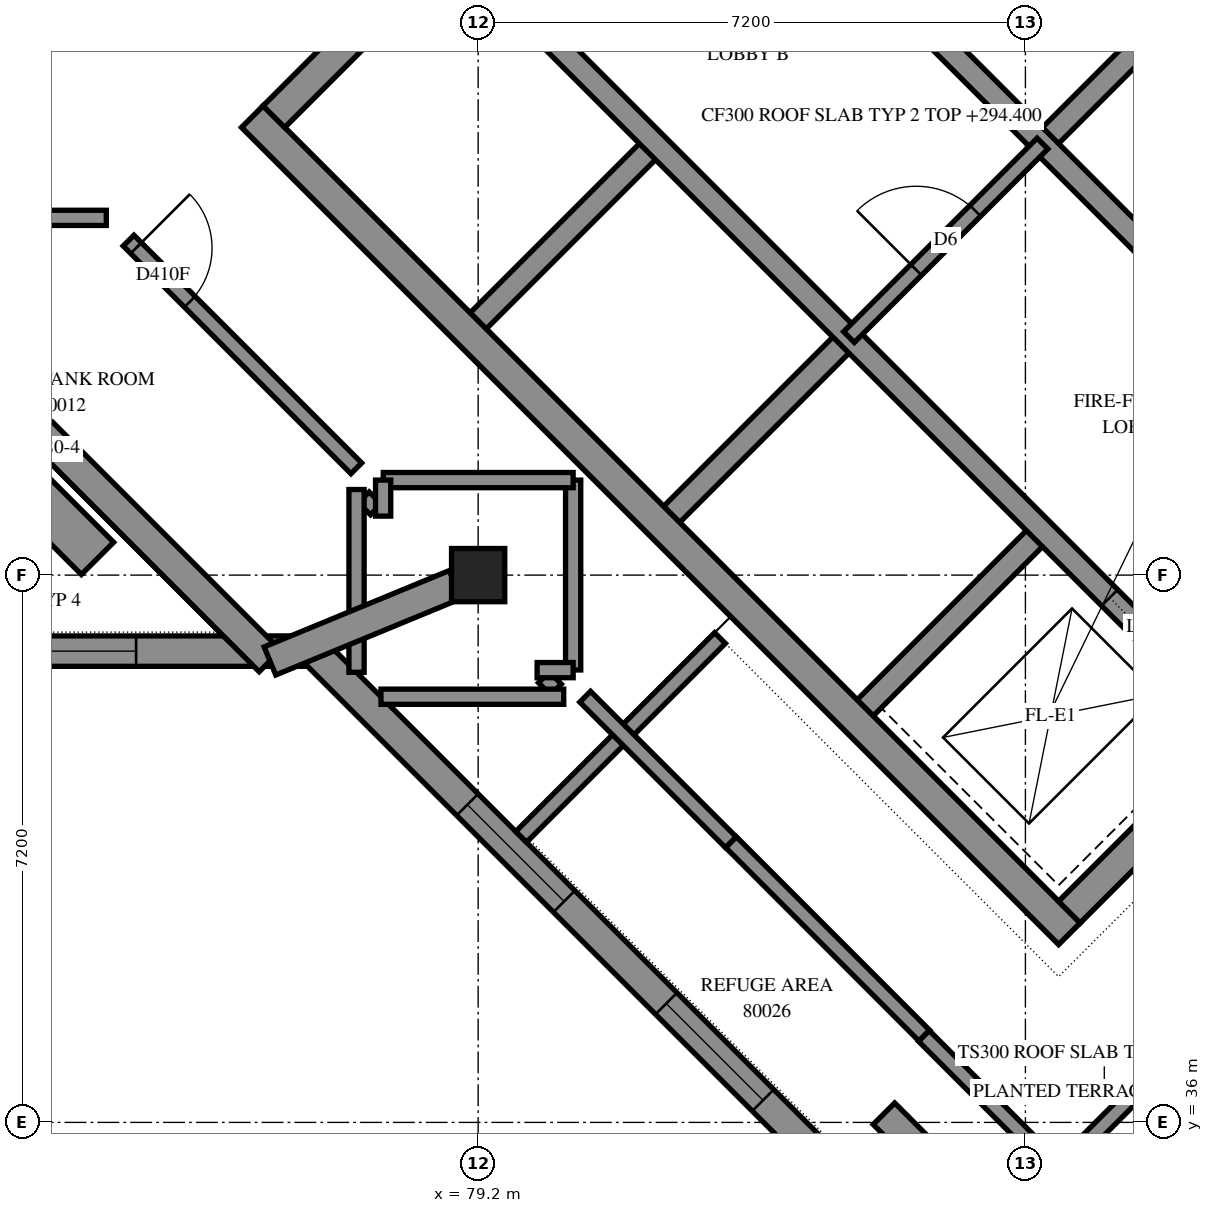
"""IFC4 building model, lengths in metres.
Left out: names, types, materials, properties, quantities, classifications, styles, units other than length and angle.
Written with IfcOpenShell. Run it as: python <this file> out.ifc"""

import sys

from ifc_helpers import new_model, si_unit, direction, frame, frame_2d, origin, origin_2d, place, context, subcontext, project, spatial, polyline, rectangle, outline, extrude, element, fill, save


model = new_model("IFC4")
c1 = context("Model", 3, precision=1e-05, world=origin(), true_north=direction((0.0, 1.0)))
c2 = subcontext(c1, "Body", "Model", "MODEL_VIEW")
j1 = project(units=[si_unit("LENGTHUNIT", "METRE"), si_unit("PLANEANGLEUNIT", "RADIAN")], contexts=[c1])
p1 = place(None, origin())
s1 = spatial("IfcSite", under=j1, at=p1, CompositionType="ELEMENT")
p2 = place(p1, origin())
s2 = spatial("IfcBuilding", under=s1, at=p2, CompositionType="ELEMENT")
p3 = place(p2, frame((0.0, 0.0, 294.4)))
s3 = spatial("IfcBuildingStorey", under=s2, at=p3, CompositionType="ELEMENT", Elevation=294.4)
p4 = place(p3, frame((79.2, 43.2, 0.0), z_axis=(0.0, 0.0, 1.0), x_axis=(1.0, 0.0, 0.0)))
e1 = element("IfcColumn", 1, at=p4, inside=s3, PredefinedType="COLUMN", context=c2, shape_type="SweptSolid", body=[
    extrude(rectangle(XDim=0.7, YDim=0.7, at=origin_2d()), origin(), (0.0, 0.0, 1.0), 3.5),
])
p5 = place(p3, frame((76.23, 49.231, -0.3), z_axis=(0.0, 0.0, 1.0), x_axis=(0.7071034917, -0.7071100706, 0.0)))
e2 = element("IfcWall", 2, at=p5, inside=s3, PredefinedType="SHEAR", context=c2, shape_type="SweptSolid", body=[
    extrude(outline(polyline([(0.0, 0.0), (15.2, 0.0), (15.2, 3.1), (0.0, 3.1), (0.0, 0.0)])), frame((0.0, 0.2, 0.0), z_axis=(0.0, -1.0, 0.0), x_axis=(1.0, 0.0, 0.0)), (0.0, 0.0, 1.0), 0.4),
])
p6 = place(p3, frame((86.695, 59.696, -0.3), z_axis=(0.0, 0.0, 1.0), x_axis=(0.7071100706, -0.7071034917, 0.0)))
e3 = element("IfcWall", 3, at=p6, inside=s3, PredefinedType="SHEAR", context=c2, shape_type="SweptSolid", body=[
    extrude(outline(polyline([(0.0, 0.0), (15.2, 0.0), (15.2, 3.1), (0.0, 3.1), (0.0, 0.0)])), frame((0.0, 0.2, 0.0), z_axis=(0.0, -1.0, 0.0), x_axis=(1.0, 0.0, 0.0)), (0.0, 0.0, 1.0), 0.4),
])
p7 = place(p6, frame((10.4, 0.0, 0.3)))
e4 = element("IfcOpeningElement", 4, at=p7, cuts=e3, PredefinedType="OPENING", context=c2, shape_type="SweptSolid", body=[
    extrude(rectangle(XDim=0.8, YDim=2.1, at=frame_2d((0.4, 1.05))), frame((0.0, 0.21, 0.0), z_axis=(0.0, -1.0, 0.0), x_axis=(1.0, 0.0, 0.0)), (0.0, 0.0, 1.0), 0.42),
])
p8 = place(p3, frame((76.513, 49.231, -0.3), z_axis=(0.0, 0.0, 1.0), x_axis=(0.7071067812, 0.7071067812, 0.0)))
e5 = element("IfcWall", 5, at=p8, inside=s3, PredefinedType="SHEAR", context=c2, shape_type="SweptSolid", body=[
    extrude(outline(polyline([(0.0, 0.0), (14.4, 0.0), (14.4, 3.1), (0.0, 3.1), (0.0, 0.0)])), frame((0.0, 0.2, 0.0), z_axis=(0.0, -1.0, 0.0), x_axis=(1.0, 0.0, 0.0)), (0.0, 0.0, 1.0), 0.4),
])
p9 = place(p8, frame((4.55, 0.0, 0.3)))
e6 = element("IfcOpeningElement", 6, at=p9, cuts=e5, PredefinedType="OPENING", context=c2, shape_type="SweptSolid", body=[
    extrude(rectangle(XDim=1.1, YDim=2.1, at=frame_2d((0.55, 1.05))), frame((0.0, 0.21, 0.0), z_axis=(0.0, -1.0, 0.0), x_axis=(1.0, 0.0, 0.0)), (0.0, 0.0, 1.0), 0.42),
])
p10 = place(p8, frame((11.35, 0.0, 0.3)))
e7 = element("IfcOpeningElement", 7, at=p10, cuts=e5, PredefinedType="OPENING", context=c2, shape_type="SweptSolid", body=[
    extrude(rectangle(XDim=1.1, YDim=2.1, at=frame_2d((0.55, 1.05))), frame((0.0, 0.21, 0.0), z_axis=(0.0, -1.0, 0.0), x_axis=(1.0, 0.0, 0.0)), (0.0, 0.0, 1.0), 0.42),
])
p11 = place(p3, frame((86.978, 38.766, -0.3), z_axis=(0.0, 0.0, 1.0), x_axis=(0.7071067812, 0.7071067812, 0.0)))
e8 = element("IfcWall", 8, at=p11, inside=s3, PredefinedType="SHEAR", context=c2, shape_type="SweptSolid", body=[
    extrude(outline(polyline([(0.0, 0.0), (14.4, 0.0), (14.4, 3.1), (0.0, 3.1), (0.0, 0.0)])), frame((0.0, 0.2, 0.0), z_axis=(0.0, -1.0, 0.0), x_axis=(1.0, 0.0, 0.0)), (0.0, 0.0, 1.0), 0.4),
])
p12 = place(p11, frame((4.55, 0.0, 0.3)))
e9 = element("IfcOpeningElement", 9, at=p12, cuts=e8, PredefinedType="OPENING", context=c2, shape_type="SweptSolid", body=[
    extrude(rectangle(XDim=1.1, YDim=2.1, at=frame_2d((0.55, 1.05))), frame((0.0, 0.21, 0.0), z_axis=(0.0, -1.0, 0.0), x_axis=(1.0, 0.0, 0.0)), (0.0, 0.0, 1.0), 0.42),
])
p13 = place(p11, frame((11.35, 0.0, 0.3)))
e10 = element("IfcOpeningElement", 10, at=p13, cuts=e8, PredefinedType="OPENING", context=c2, shape_type="SweptSolid", body=[
    extrude(rectangle(XDim=1.1, YDim=2.1, at=frame_2d((0.55, 1.05))), frame((0.0, 0.21, 0.0), z_axis=(0.0, -1.0, 0.0), x_axis=(1.0, 0.0, 0.0)), (0.0, 0.0, 1.0), 0.42),
])
p14 = place(p3, frame((79.2, 46.544, 0.0), z_axis=(0.0, 0.0, 1.0), x_axis=(0.7071219326, 0.7070916295, 0.0)))
e11 = element("IfcWall", 11, at=p14, inside=s3, PredefinedType="SOLIDWALL", context=c2, shape_type="SweptSolid", body=[
    extrude(outline(polyline([(0.0, 0.0), (3.3, 0.0), (3.3, 3.5), (0.0, 3.5), (0.0, 0.0)])), frame((0.0, 0.15, 0.0), z_axis=(0.0, -1.0, 0.0), x_axis=(1.0, 0.0, 0.0)), (0.0, 0.0, 1.0), 0.3),
])
p15 = place(p3, frame((81.746, 43.999, 0.0), z_axis=(0.0, 0.0, 1.0), x_axis=(0.7071067812, 0.7071067812, 0.0)))
e12 = element("IfcWall", 12, at=p15, inside=s3, PredefinedType="SOLIDWALL", context=c2, shape_type="SweptSolid", body=[
    extrude(outline(polyline([(0.0, 0.0), (3.3, 0.0), (3.3, 3.5), (0.0, 3.5), (0.0, 0.0)])), frame((0.0, 0.15, 0.0), z_axis=(0.0, -1.0, 0.0), x_axis=(1.0, 0.0, 0.0)), (0.0, 0.0, 1.0), 0.3),
])
p16 = place(p3, frame((86.625, 48.878, 0.0), z_axis=(0.0, 0.0, 1.0), x_axis=(0.7071067812, 0.7071067812, 0.0)))
e13 = element("IfcWall", 13, at=p16, inside=s3, PredefinedType="SOLIDWALL", context=c2, shape_type="SweptSolid", body=[
    extrude(outline(polyline([(0.0, 0.0), (3.3, 0.0), (3.3, 3.5), (0.0, 3.5), (0.0, 0.0)])), frame((0.0, 0.15, 0.0), z_axis=(0.0, -1.0, 0.0), x_axis=(1.0, 0.0, 0.0)), (0.0, 0.0, 1.0), 0.3),
])
p17 = place(p3, frame((84.291, 41.453, 0.0), z_axis=(0.0, 0.0, 1.0), x_axis=(0.7071067812, 0.7071067812, 0.0)))
e14 = element("IfcWall", 14, at=p17, inside=s3, PredefinedType="SOLIDWALL", context=c2, shape_type="SweptSolid", body=[
    extrude(outline(polyline([(0.0, 0.0), (3.3, 0.0), (3.3, 3.5), (0.0, 3.5), (0.0, 0.0)])), frame((0.0, 0.15, 0.0), z_axis=(0.0, -1.0, 0.0), x_axis=(1.0, 0.0, 0.0)), (0.0, 0.0, 1.0), 0.3),
])
p18 = place(p3, frame((78.988, 51.423, 0.0), z_axis=(0.0, 0.0, 1.0), x_axis=(0.7071067812, -0.7071067812, 0.0)))
e15 = element("IfcWall", 15, at=p18, inside=s3, PredefinedType="SOLIDWALL", context=c2, shape_type="SweptSolid", body=[
    extrude(outline(polyline([(0.0, 0.0), (14.4, 0.0), (14.4, 3.5), (0.0, 3.5), (0.0, 0.0)])), frame((0.0, 0.15, 0.0), z_axis=(0.0, -1.0, 0.0), x_axis=(1.0, 0.0, 0.0)), (0.0, 0.0, 1.0), 0.3),
])
p19 = place(p18, frame((12.05, 0.0, 0.0)))
e16 = element("IfcOpeningElement", 16, at=p19, cuts=e15, PredefinedType="OPENING", context=c2, shape_type="SweptSolid", body=[
    extrude(rectangle(XDim=1.1, YDim=2.1, at=frame_2d((0.55, 1.05))), frame((0.0, 0.16, 0.0), z_axis=(0.0, -1.0, 0.0), x_axis=(1.0, 0.0, 0.0)), (0.0, 0.0, 1.0), 0.32),
])
p20 = place(p3, frame((81.534, 53.969, 0.0), z_axis=(0.0, 0.0, 1.0), x_axis=(0.707103309, -0.7071102534, 0.0)))
e17 = element("IfcWall", 17, at=p20, inside=s3, PredefinedType="SOLIDWALL", context=c2, shape_type="SweptSolid", body=[
    extrude(outline(polyline([(0.0, 0.0), (14.4, 0.0), (14.4, 3.5), (0.0, 3.5), (0.0, 0.0)])), frame((0.0, 0.15, 0.0), z_axis=(0.0, -1.0, 0.0), x_axis=(1.0, 0.0, 0.0)), (0.0, 0.0, 1.0), 0.3),
])
p21 = place(p20, frame((12.05, 0.0, 0.0)))
e18 = element("IfcOpeningElement", 18, at=p21, cuts=e17, PredefinedType="OPENING", context=c2, shape_type="SweptSolid", body=[
    extrude(rectangle(XDim=1.1, YDim=2.1, at=frame_2d((0.55, 1.05))), frame((0.0, 0.16, 0.0), z_axis=(0.0, -1.0, 0.0), x_axis=(1.0, 0.0, 0.0)), (0.0, 0.0, 1.0), 0.32),
])
p22 = place(p3, frame((71.0, 42.2, 0.0), z_axis=(0.0, 0.0, 1.0), x_axis=(1.0, 0.0, 0.0)))
e19 = element("IfcWall", 19, at=p22, inside=s3, PredefinedType="SOLIDWALL", context=c2, shape_type="SweptSolid", body=[
    extrude(outline(polyline([(-0.2, -0.2), (5.956, -0.2), (6.122, 0.2), (0.2, 0.2), (-0.2, -0.2)])), origin(), (0.0, 0.0, 1.0), 3.5),
])
p23 = place(p22, frame((1.9, 0.0, 0.7)))
e20 = element("IfcOpeningElement", 20, at=p23, cuts=e19, PredefinedType="OPENING", context=c2, shape_type="SweptSolid", body=[
    extrude(rectangle(XDim=1.8, YDim=2.2, at=frame_2d((0.9, 1.1))), frame((0.0, 0.21, 0.0), z_axis=(0.0, -1.0, 0.0), x_axis=(1.0, 0.0, 0.0)), (0.0, 0.0, 1.0), 0.42),
])
p24 = place(p3, frame((77.039, 42.2, 0.0), z_axis=(0.0, 0.0, 1.0), x_axis=(0.7071067812, -0.7071067812, 0.0)))
e21 = element("IfcWall", 21, at=p24, inside=s3, PredefinedType="SOLIDWALL", context=c2, shape_type="SweptSolid", body=[
    extrude(outline(polyline([(0.083, -0.2), (17.656, -0.2), (17.256, 0.2), (-0.083, 0.2), (0.083, -0.2)])), origin(), (0.0, 0.0, 1.0), 3.5),
])
p25 = place(p24, frame((2.857, 0.0, 0.7)))
e22 = element("IfcOpeningElement", 22, at=p25, cuts=e21, PredefinedType="OPENING", context=c2, shape_type="SweptSolid", body=[
    extrude(rectangle(XDim=1.8, YDim=2.2, at=frame_2d((0.9, 1.1))), frame((0.0, 0.21, 0.0), z_axis=(0.0, -1.0, 0.0), x_axis=(1.0, 0.0, 0.0)), (0.0, 0.0, 1.0), 0.42),
])
p26 = place(p24, frame((6.556, 0.0, 0.7)))
e23 = element("IfcOpeningElement", 23, at=p26, cuts=e21, PredefinedType="OPENING", context=c2, shape_type="SweptSolid", body=[
    extrude(rectangle(XDim=1.8, YDim=2.2, at=frame_2d((0.9, 1.1))), frame((0.0, 0.21, 0.0), z_axis=(0.0, -1.0, 0.0), x_axis=(1.0, 0.0, 0.0)), (0.0, 0.0, 1.0), 0.42),
])
p27 = place(p24, frame((10.156, 0.0, 0.7)))
e24 = element("IfcOpeningElement", 24, at=p27, cuts=e21, PredefinedType="OPENING", context=c2, shape_type="SweptSolid", body=[
    extrude(rectangle(XDim=1.8, YDim=2.2, at=frame_2d((0.9, 1.1))), frame((0.0, 0.21, 0.0), z_axis=(0.0, -1.0, 0.0), x_axis=(1.0, 0.0, 0.0)), (0.0, 0.0, 1.0), 0.42),
])
p28 = place(p24, frame((13.757, 0.0, 0.7)))
e25 = element("IfcOpeningElement", 25, at=p28, cuts=e21, PredefinedType="OPENING", context=c2, shape_type="SweptSolid", body=[
    extrude(rectangle(XDim=1.8, YDim=2.2, at=frame_2d((0.9, 1.1))), frame((0.0, 0.21, 0.0), z_axis=(0.0, -1.0, 0.0), x_axis=(1.0, 0.0, 0.0)), (0.0, 0.0, 1.0), 0.42),
])
p29 = place(p3, frame((75.99, 42.4, 0.0), z_axis=(0.0, 0.0, 1.0), x_axis=(-0.7071067812, 0.7071067812, 0.0)))
e26 = element("IfcWall", 26, at=p29, inside=s3, PredefinedType="PARAPET", context=c2, shape_type="SweptSolid", body=[
    extrude(outline(polyline([(0.0, -0.1), (6.774, -0.1), (6.774, 0.1), (0.0, 0.1), (0.0, -0.1)])), origin(), (0.0, 0.0, 1.0), 0.25),
])
p30 = place(p3, frame((82.382, 42.372, 0.0), z_axis=(0.0, 0.0, 1.0), x_axis=(-0.7071202943, -0.7070932678, 0.0)))
e27 = element("IfcWall", 27, at=p30, inside=s3, PredefinedType="PARAPET", context=c2, shape_type="SweptSolid", body=[
    extrude(outline(polyline([(0.0, -0.1), (3.7, -0.1), (3.7, 0.1), (0.0, 0.1), (0.0, -0.1)])), origin(), (0.0, 0.0, 1.0), 0.25),
])
p31 = place(p3, frame((84.079, 46.332, 0.0), z_axis=(0.0, 0.0, 1.0), x_axis=(0.7071067812, 0.7071067812, 0.0)))
e28 = element("IfcWall", 28, at=p31, inside=s3, PredefinedType="PARTITIONING", context=c2, shape_type="SweptSolid", body=[
    extrude(outline(polyline([(0.0, 0.0), (3.6, 0.0), (3.6, 3.5), (0.0, 3.5), (0.0, 0.0)])), frame((0.0, 0.1, 0.0), z_axis=(0.0, -1.0, 0.0), x_axis=(1.0, 0.0, 0.0)), (0.0, 0.0, 1.0), 0.2),
])
p32 = place(p31, frame((1.25, 0.0, 0.0)))
e29 = element("IfcOpeningElement", 29, at=p32, cuts=e28, PredefinedType="OPENING", context=c2, shape_type="SweptSolid", body=[
    extrude(rectangle(XDim=1.1, YDim=2.1, at=frame_2d((0.55, 1.05))), frame((0.0, 0.11, 0.0), z_axis=(0.0, -1.0, 0.0), x_axis=(1.0, 0.0, 0.0)), (0.0, 0.0, 1.0), 0.22),
])
p33 = place(p3, frame((86.836, 35.372, 0.0), z_axis=(0.0, 0.0, 1.0), x_axis=(0.7071067812, 0.7071067812, 0.0)))
e30 = element("IfcWall", 30, at=p33, inside=s3, PredefinedType="PARTITIONING", context=c2, shape_type="SweptSolid", body=[
    extrude(rectangle(XDim=8.651, YDim=0.2, at=frame_2d((4.325, 0.0))), origin(), (0.0, 0.0, 1.0), 3.5),
])
p34 = place(p33, frame((7.502, 0.0, 0.0)))
e31 = element("IfcOpeningElement", 31, at=p34, cuts=e30, PredefinedType="OPENING", context=c2, shape_type="SweptSolid", body=[
    extrude(rectangle(XDim=1.0, YDim=2.1, at=frame_2d((0.5, 1.05))), frame((0.0, 0.11, 0.0), z_axis=(0.0, -1.0, 0.0), x_axis=(1.0, 0.0, 0.0)), (0.0, 0.0, 1.0), 0.22),
])
p35 = place(p3, frame((74.601, 47.601, 0.0), z_axis=(0.0, 0.0, 1.0), x_axis=(0.7071067812, -0.7071067812, 0.0)))
e32 = element("IfcWall", 32, at=p35, inside=s3, PredefinedType="PARTITIONING", context=c2, shape_type="SweptSolid", body=[
    extrude(rectangle(XDim=4.237, YDim=0.2, at=frame_2d((2.119, 0.0))), origin(), (0.0, 0.0, 1.0), 3.5),
])
p36 = place(p35, frame((0.139, 0.0, 0.0)))
e33 = element("IfcOpeningElement", 33, at=p36, cuts=e32, PredefinedType="OPENING", context=c2, shape_type="SweptSolid", body=[
    extrude(rectangle(XDim=1.0, YDim=2.1, at=frame_2d((0.5, 1.05))), frame((0.0, 0.11, 0.0), z_axis=(0.0, -1.0, 0.0), x_axis=(1.0, 0.0, 0.0)), (0.0, 0.0, 1.0), 0.22),
])
p37 = place(p3, frame((82.526, 39.688, 0.0), z_axis=(0.0, 0.0, 1.0), x_axis=(0.7068288851, -0.7073845681, 0.0)))
e34 = element("IfcWall", 34, at=p37, inside=s3, PredefinedType="PARTITIONING", context=c2, shape_type="SweptSolid", body=[
    extrude(rectangle(XDim=3.599, YDim=0.2, at=frame_2d((1.8, 0.0))), origin(), (0.0, 0.0, 1.0), 3.5),
])
p38 = place(p3, frame((80.608, 41.6, 0.0), z_axis=(0.0, 0.0, 1.0), x_axis=(0.7074759311, -0.7067374385, 0.0)))
e35 = element("IfcWall", 35, at=p38, inside=s3, PredefinedType="PARTITIONING", context=c2, shape_type="SweptSolid", body=[
    extrude(rectangle(XDim=2.708, YDim=0.2, at=frame_2d((1.354, 0.0))), origin(), (0.0, 0.0, 1.0), 3.5),
])
p39 = place(p3, frame((85.065, 37.137, 0.0), z_axis=(0.0, 0.0, 1.0), x_axis=(0.7071067812, -0.7071067812, 0.0)))
e36 = element("IfcWall", 36, at=p39, inside=s3, PredefinedType="PARTITIONING", context=c2, shape_type="SweptSolid", body=[
    extrude(rectangle(XDim=2.5, YDim=0.2, at=frame_2d((1.25, 0.0))), origin(), (0.0, 0.0, 1.0), 3.5),
])
for number, where, z_axis, x_axis in (
    (37, (80.45, 41.952, 0.0), (0.0, 0.0, 1.0), (0.0, 1.0, 0.0)),
    (38, (77.952, 44.45, 0.0), (0.0, 0.0, 1.0), (1.0, 0.0, 0.0)),
):
    element("IfcWall", number, at=place(p3, frame(where, z_axis=z_axis, x_axis=x_axis)), inside=s3, PredefinedType="PARTITIONING", context=c2, shape_type="SweptSolid", body=[
        extrude(rectangle(XDim=2.498, YDim=0.2, at=frame_2d((1.249, 0.0))), origin(), (0.0, 0.0, 1.0), 3.5),
    ])
for number, where, z_axis, x_axis in (
    (39, (77.696, 44.224, 0.0), (0.0, 0.0, 1.0), (0.707, -0.707, 0.0)),
    (40, (80.065, 41.855, 0.0), (0.0, 0.0, 1.0), (0.707, -0.707, 0.0)),
):
    element("IfcWall", number, at=place(p3, frame(where, z_axis=z_axis, x_axis=x_axis)), inside=s3, PredefinedType="PARTITIONING", context=c2, shape_type="SweptSolid", body=[
        extrude(rectangle(XDim=0.225, YDim=0.2, at=frame_2d((0.113, 0.0))), origin(), (0.0, 0.0, 1.0), 3.5),
    ])
for number, where, z_axis, x_axis in (
    (41, (79.976, 41.95, 0.0), (0.0, 0.0, 1.0), (1.0, 0.0, 0.0)),
    (42, (77.95, 43.976, 0.0), (0.0, 0.0, 1.0), (0.0, 1.0, 0.0)),
):
    element("IfcWall", number, at=place(p3, frame(where, z_axis=z_axis, x_axis=x_axis)), inside=s3, PredefinedType="PARTITIONING", context=c2, shape_type="SweptSolid", body=[
        extrude(rectangle(XDim=0.474, YDim=0.2, at=frame_2d((0.237, 0.0))), origin(), (0.0, 0.0, 1.0), 3.5),
    ])
p40 = place(p3, frame((74.192, 43.42, 0.0), z_axis=(0.0, 0.0, 1.0), x_axis=(-0.7071067812, 0.7071067812, 0.0)))
e43 = element("IfcWall", 43, at=p40, inside=s3, PredefinedType="SOLIDWALL", context=c2, shape_type="SweptSolid", body=[
    extrude(outline(polyline([(0.0, -0.3), (2.789, -0.3), (2.789, 0.3), (0.0, 0.3), (0.0, -0.3)])), origin(), (0.0, 0.0, 1.0), 0.65),
])
p41 = place(p3, frame((86.272, 33.25, 0.0), z_axis=(0.0, 0.0, 1.0), x_axis=(0.7073028348, 0.7069106732, 0.0)))
e44 = element("IfcWall", 44, at=p41, inside=s3, PredefinedType="PARTITIONING", context=c2, shape_type="SweptSolid", body=[
    extrude(outline(polyline([(0.0, -0.1), (5.1, -0.1), (5.1, 0.1), (0.0, 0.1), (0.0, -0.1)])), origin(), (0.0, 0.0, 1.0), 3.5),
])
p42 = place(p3, frame((71.2, 47.9, 0.0), z_axis=(0.0, 0.0, 1.0), x_axis=(1.0, 0.0, 0.0)))
e45 = element("IfcWall", 45, at=p42, inside=s3, PredefinedType="PARTITIONING", context=c2, shape_type="SweptSolid", body=[
    extrude(outline(polyline([(0.0, -0.1), (3.108, -0.1), (3.108, 0.1), (0.0, 0.1), (0.0, -0.1)])), origin(), (0.0, 0.0, 1.0), 3.5),
])
for number, where, z_axis, x_axis in (
    (46, (77.6, 41.922, 0.0), (0.0, 0.0, 1.0), (0.0, 1.0, 0.0)),
    (47, (77.922, 41.6, 0.0), (0.0, 0.0, 1.0), (1.0, 0.0, 0.0)),
):
    element("IfcWall", number, at=place(p3, frame(where, z_axis=z_axis, x_axis=x_axis)), inside=s3, PredefinedType="PARTITIONING", context=c2, shape_type="SweptSolid", body=[
        extrude(outline(polyline([(0.0, -0.1), (2.404, -0.1), (2.404, 0.1), (0.0, 0.1), (0.0, -0.1)])), origin(), (0.0, 0.0, 1.0), 3.5),
    ])
p43 = place(p23, origin())
e48 = element("IfcWindow", 48, at=p43, inside=s3, PartitioningType="SINGLE_PANEL", PredefinedType="WINDOW", context=c2, shape_type="SweptSolid", body=[
    extrude(rectangle(XDim=1.8, YDim=2.2, at=frame_2d((0.9, 1.1))), frame((0.0, 0.08, 0.0), z_axis=(0.0, -1.0, 0.0), x_axis=(1.0, 0.0, 0.0)), (0.0, 0.0, 1.0), 0.06),
])
fill(e20, e48)
p44 = place(p25, origin())
e49 = element("IfcWindow", 49, at=p44, inside=s3, PartitioningType="SINGLE_PANEL", PredefinedType="WINDOW", context=c2, shape_type="SweptSolid", body=[
    extrude(rectangle(XDim=1.8, YDim=2.2, at=frame_2d((0.9, 1.1))), frame((0.0, 0.08, 0.0), z_axis=(0.0, -1.0, 0.0), x_axis=(1.0, 0.0, 0.0)), (0.0, 0.0, 1.0), 0.06),
])
fill(e22, e49)
p45 = place(p26, origin())
e50 = element("IfcWindow", 50, at=p45, inside=s3, PartitioningType="SINGLE_PANEL", PredefinedType="WINDOW", context=c2, shape_type="SweptSolid", body=[
    extrude(rectangle(XDim=1.8, YDim=2.2, at=frame_2d((0.9, 1.1))), frame((0.0, 0.08, 0.0), z_axis=(0.0, -1.0, 0.0), x_axis=(1.0, 0.0, 0.0)), (0.0, 0.0, 1.0), 0.06),
])
fill(e23, e50)
p46 = place(p32, origin())
e51 = element("IfcDoor", 51, at=p46, inside=s3, OperationType="DOUBLE_DOOR_SINGLE_SWING", PredefinedType="DOOR", context=c2, shape_type="SweptSolid", body=[
    extrude(rectangle(XDim=1.1, YDim=2.1, at=frame_2d((0.55, 1.05))), frame((0.0, 0.025, 0.0), z_axis=(0.0, -1.0, 0.0), x_axis=(1.0, 0.0, 0.0)), (0.0, 0.0, 1.0), 0.05),
])
fill(e29, e51)
p47 = place(p19, origin())
e52 = element("IfcDoor", 52, at=p47, inside=s3, OperationType="SLIDING_TO_RIGHT", PredefinedType="DOOR", context=c2, shape_type="SweptSolid", body=[
    extrude(rectangle(XDim=1.1, YDim=2.1, at=frame_2d((0.55, 1.05))), frame((0.0, 0.025, 0.0), z_axis=(0.0, -1.0, 0.0), x_axis=(1.0, 0.0, 0.0)), (0.0, 0.0, 1.0), 0.05),
])
fill(e16, e52)
p48 = place(p36, origin())
e53 = element("IfcDoor", 53, at=p48, inside=s3, OperationType="SINGLE_SWING_LEFT", PredefinedType="DOOR", context=c2, shape_type="SweptSolid", body=[
    extrude(rectangle(XDim=1.0, YDim=2.1, at=frame_2d((0.5, 1.05))), frame((0.0, 0.025, 0.0), z_axis=(0.0, -1.0, 0.0), x_axis=(1.0, 0.0, 0.0)), (0.0, 0.0, 1.0), 0.05),
])
fill(e33, e53)
save(model, sys.argv[1])
